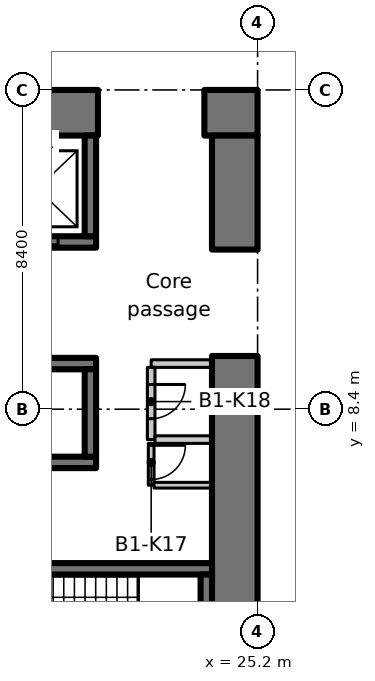
"""IFC4 building model, lengths in metres.
Left out: names, types, materials, properties, quantities, classifications, styles, units other than length and angle.
Written with IfcOpenShell. Run it as: python <this file> out.ifc"""

import sys

from ifc_helpers import new_model, si_unit, direction, frame, frame_2d, origin, place, context, subcontext, project, spatial, rectangle, extrude, element, fill, save


model = new_model("IFC4")
c1 = context("Model", 3, precision=1e-05, world=origin(), true_north=direction((0.0, 1.0)))
c2 = subcontext(c1, "Body", "Model", "MODEL_VIEW")
j1 = project(units=[si_unit("LENGTHUNIT", "METRE"), si_unit("PLANEANGLEUNIT", "RADIAN")], contexts=[c1])
p1 = place(None, origin())
s1 = spatial("IfcSite", under=j1, at=p1, CompositionType="ELEMENT")
p2 = place(p1, origin())
s2 = spatial("IfcBuilding", under=s1, at=p2, CompositionType="ELEMENT")
p3 = place(p2, frame((0.0, 0.0, -6.0)))
s3 = spatial("IfcBuildingStorey", under=s2, at=p3, CompositionType="ELEMENT", Elevation=-6.0)
p4 = place(p3, frame((-2.9, 16.2, 0.0), z_axis=(0.0, 0.0, 1.0), x_axis=(1.0, 0.0, 0.0)))
e1 = element("IfcWall", 1, at=p4, inside=s3, PredefinedType="SHEAR", context=c2, shape_type="SweptSolid", body=[
    extrude(rectangle(XDim=23.9, YDim=1.2, at=frame_2d((11.95, 0.0))), origin(), (0.0, 0.0, 1.0), 5.6),
])
p5 = place(p4, frame((4.95, 0.0, 0.0)))
e2 = element("IfcOpeningElement", 2, at=p5, cuts=e1, PredefinedType="OPENING", context=c2, shape_type="SweptSolid", body=[
    extrude(rectangle(XDim=1.1, YDim=2.3, at=frame_2d((0.55, 1.15))), frame((0.0, 0.61, 0.0), z_axis=(0.0, -1.0, 0.0), x_axis=(1.0, 0.0, 0.0)), (0.0, 0.0, 1.0), 1.22),
])
p6 = place(p3, frame((23.8, 16.2, 0.0), z_axis=(0.0, 0.0, 1.0), x_axis=(1.0, 0.0, 0.0)))
e3 = element("IfcWall", 3, at=p6, inside=s3, PredefinedType="SHEAR", context=c2, shape_type="SweptSolid", body=[
    extrude(rectangle(XDim=1.4, YDim=1.2, at=frame_2d((0.7, 0.0))), origin(), (0.0, 0.0, 1.0), 5.6),
])
p7 = place(p3, frame((24.6, 1.2, 0.0), z_axis=(0.0, 0.0, 1.0), x_axis=(0.0, 1.0, 0.0)))
e4 = element("IfcWall", 4, at=p7, inside=s3, PredefinedType="SHEAR", context=c2, shape_type="SweptSolid", body=[
    extrude(rectangle(XDim=8.6, YDim=1.2, at=frame_2d((4.3, 0.0))), origin(), (0.0, 0.0, 1.0), 5.6),
])
p8 = place(p3, frame((24.6, 12.6, 0.0), z_axis=(0.0, 0.0, 1.0), x_axis=(0.0, 1.0, 0.0)))
e5 = element("IfcWall", 5, at=p8, inside=s3, PredefinedType="SHEAR", context=c2, shape_type="SweptSolid", body=[
    extrude(rectangle(XDim=3.0, YDim=1.2, at=frame_2d((1.5, 0.0))), origin(), (0.0, 0.0, 1.0), 5.6),
])
p9 = place(p3, frame((1.2, 7.0, 0.0), z_axis=(0.0, 0.0, 1.0), x_axis=(1.0, 0.0, 0.0)))
e6 = element("IfcWall", 6, at=p9, inside=s3, PredefinedType="SHEAR", context=c2, shape_type="SweptSolid", body=[
    extrude(rectangle(XDim=19.75, YDim=0.3, at=frame_2d((9.875, 0.0))), origin(), (0.0, 0.0, 1.0), 5.6),
])
p10 = place(p3, frame((1.2, 9.6, 0.0), z_axis=(0.0, 0.0, 1.0), x_axis=(1.0, 0.0, 0.0)))
e7 = element("IfcWall", 7, at=p10, inside=s3, PredefinedType="SHEAR", context=c2, shape_type="SweptSolid", body=[
    extrude(rectangle(XDim=19.75, YDim=0.3, at=frame_2d((9.875, 0.0))), origin(), (0.0, 0.0, 1.0), 5.6),
])
p11 = place(p10, frame((0.85, 0.0, 0.0)))
e8 = element("IfcOpeningElement", 8, at=p11, cuts=e7, PredefinedType="OPENING", context=c2, shape_type="SweptSolid", body=[
    extrude(rectangle(XDim=1.1, YDim=2.3, at=frame_2d((0.55, 1.15))), frame((0.0, 0.16, 0.0), z_axis=(0.0, -1.0, 0.0), x_axis=(1.0, 0.0, 0.0)), (0.0, 0.0, 1.0), 0.32),
])
p12 = place(p10, frame((3.65, 0.0, 0.0)))
e9 = element("IfcOpeningElement", 9, at=p12, cuts=e7, PredefinedType="OPENING", context=c2, shape_type="SweptSolid", body=[
    extrude(rectangle(XDim=1.1, YDim=2.3, at=frame_2d((0.55, 1.15))), frame((0.0, 0.16, 0.0), z_axis=(0.0, -1.0, 0.0), x_axis=(1.0, 0.0, 0.0)), (0.0, 0.0, 1.0), 0.32),
])
p13 = place(p10, frame((6.45, 0.0, 0.0)))
e10 = element("IfcOpeningElement", 10, at=p13, cuts=e7, PredefinedType="OPENING", context=c2, shape_type="SweptSolid", body=[
    extrude(rectangle(XDim=1.1, YDim=2.3, at=frame_2d((0.55, 1.15))), frame((0.0, 0.16, 0.0), z_axis=(0.0, -1.0, 0.0), x_axis=(1.0, 0.0, 0.0)), (0.0, 0.0, 1.0), 0.32),
])
p14 = place(p10, frame((9.25, 0.0, 0.0)))
e11 = element("IfcOpeningElement", 11, at=p14, cuts=e7, PredefinedType="OPENING", context=c2, shape_type="SweptSolid", body=[
    extrude(rectangle(XDim=1.1, YDim=2.3, at=frame_2d((0.55, 1.15))), frame((0.0, 0.16, 0.0), z_axis=(0.0, -1.0, 0.0), x_axis=(1.0, 0.0, 0.0)), (0.0, 0.0, 1.0), 0.32),
])
p15 = place(p10, frame((12.05, 0.0, 0.0)))
e12 = element("IfcOpeningElement", 12, at=p15, cuts=e7, PredefinedType="OPENING", context=c2, shape_type="SweptSolid", body=[
    extrude(rectangle(XDim=1.1, YDim=2.3, at=frame_2d((0.55, 1.15))), frame((0.0, 0.16, 0.0), z_axis=(0.0, -1.0, 0.0), x_axis=(1.0, 0.0, 0.0)), (0.0, 0.0, 1.0), 0.32),
])
p16 = place(p10, frame((14.85, 0.0, 0.0)))
e13 = element("IfcOpeningElement", 13, at=p16, cuts=e7, PredefinedType="OPENING", context=c2, shape_type="SweptSolid", body=[
    extrude(rectangle(XDim=1.1, YDim=2.3, at=frame_2d((0.55, 1.15))), frame((0.0, 0.16, 0.0), z_axis=(0.0, -1.0, 0.0), x_axis=(1.0, 0.0, 0.0)), (0.0, 0.0, 1.0), 0.32),
])
p17 = place(p3, frame((20.8, 7.15, 0.0), z_axis=(0.0, 0.0, 1.0), x_axis=(0.0, 1.0, 0.0)))
e14 = element("IfcWall", 14, at=p17, inside=s3, PredefinedType="SHEAR", context=c2, shape_type="SweptSolid", body=[
    extrude(rectangle(XDim=2.3, YDim=0.3, at=frame_2d((1.15, 0.0))), origin(), (0.0, 0.0, 1.0), 5.6),
])
p18 = place(p3, frame((15.05, 12.8, 0.0), z_axis=(0.0, 0.0, 1.0), x_axis=(1.0, 0.0, 0.0)))
e15 = element("IfcWall", 15, at=p18, inside=s3, PredefinedType="SHEAR", context=c2, shape_type="SweptSolid", body=[
    extrude(rectangle(XDim=5.9, YDim=0.3, at=frame_2d((2.95, 0.0))), origin(), (0.0, 0.0, 1.0), 5.6),
])
p19 = place(p18, frame((3.8, 0.0, 0.0)))
e16 = element("IfcOpeningElement", 16, at=p19, cuts=e15, PredefinedType="OPENING", context=c2, shape_type="SweptSolid", body=[
    extrude(rectangle(XDim=1.1, YDim=2.3, at=frame_2d((0.55, 1.15))), frame((0.0, 0.16, 0.0), z_axis=(0.0, -1.0, 0.0), x_axis=(1.0, 0.0, 0.0)), (0.0, 0.0, 1.0), 0.32),
])
p20 = place(p3, frame((20.8, 12.95, 0.0), z_axis=(0.0, 0.0, 1.0), x_axis=(0.0, 1.0, 0.0)))
e17 = element("IfcWall", 17, at=p20, inside=s3, PredefinedType="SHEAR", context=c2, shape_type="SweptSolid", body=[
    extrude(rectangle(XDim=2.65, YDim=0.3, at=frame_2d((1.325, 0.0))), origin(), (0.0, 0.0, 1.0), 5.6),
])
p21 = place(p3, frame((15.8, 4.2, 0.0), z_axis=(0.0, 0.0, 1.0), x_axis=(1.0, 0.0, 0.0)))
e18 = element("IfcWall", 18, at=p21, inside=s3, PredefinedType="SHEAR", context=c2, shape_type="SweptSolid", body=[
    extrude(rectangle(XDim=8.2, YDim=0.3, at=frame_2d((4.1, 0.0))), origin(), (0.0, 0.0, 1.0), 5.6),
])
p22 = place(p21, frame((0.4, 0.0, 0.0)))
e19 = element("IfcOpeningElement", 19, at=p22, cuts=e18, PredefinedType="OPENING", context=c2, shape_type="SweptSolid", body=[
    extrude(rectangle(XDim=1.0, YDim=2.1, at=frame_2d((0.5, 1.05))), frame((0.0, 0.16, 0.0), z_axis=(0.0, -1.0, 0.0), x_axis=(1.0, 0.0, 0.0)), (0.0, 0.0, 1.0), 0.32),
])
p23 = place(p3, frame((23.85, 1.5, 0.0), z_axis=(0.0, 0.0, 1.0), x_axis=(0.0, 1.0, 0.0)))
e20 = element("IfcWall", 20, at=p23, inside=s3, PredefinedType="SHEAR", context=c2, shape_type="SweptSolid", body=[
    extrude(rectangle(XDim=2.55, YDim=0.3, at=frame_2d((1.275, 0.0))), origin(), (0.0, 0.0, 1.0), 5.6),
])
p24 = place(p3, frame((23.988, 9.6, 0.0), z_axis=(0.0, 0.0, 1.0), x_axis=(-1.0, 0.0, 0.0)))
e21 = element("IfcWall", 21, at=p24, inside=s3, PredefinedType="PARTITIONING", context=c2, shape_type="SweptSolid", body=[
    extrude(rectangle(XDim=1.588, YDim=0.2, at=frame_2d((0.794, 0.0))), origin(), (0.0, 0.0, 1.0), 5.6),
])
p25 = place(p3, frame((22.4, 9.5, 0.0), z_axis=(0.0, 0.0, 1.0), x_axis=(0.0, -1.0, 0.0)))
e22 = element("IfcWall", 22, at=p25, inside=s3, PredefinedType="PARTITIONING", context=c2, shape_type="SweptSolid", body=[
    extrude(rectangle(XDim=1.9, YDim=0.2, at=frame_2d((0.95, 0.0))), origin(), (0.0, 0.0, 1.0), 5.6),
])
p26 = place(p25, frame((0.45, 0.0, 0.0)))
e23 = element("IfcOpeningElement", 23, at=p26, cuts=e22, PredefinedType="OPENING", context=c2, shape_type="SweptSolid", body=[
    extrude(rectangle(XDim=0.9, YDim=2.1, at=frame_2d((0.45, 1.05))), frame((0.0, 0.11, 0.0), z_axis=(0.0, -1.0, 0.0), x_axis=(1.0, 0.0, 0.0)), (0.0, 0.0, 1.0), 0.22),
])
p27 = place(p3, frame((22.5, 7.6, 0.0), z_axis=(0.0, 0.0, 1.0), x_axis=(1.0, 0.0, 0.0)))
e24 = element("IfcWall", 24, at=p27, inside=s3, PredefinedType="PARTITIONING", context=c2, shape_type="SweptSolid", body=[
    extrude(rectangle(XDim=1.488, YDim=0.2, at=frame_2d((0.744, 0.0))), origin(), (0.0, 0.0, 1.0), 5.6),
])
p28 = place(p3, frame((22.4, 7.5, 0.0), z_axis=(0.0, 0.0, 1.0), x_axis=(0.0, -1.0, 0.0)))
e25 = element("IfcWall", 25, at=p28, inside=s3, PredefinedType="PARTITIONING", context=c2, shape_type="SweptSolid", body=[
    extrude(rectangle(XDim=1.1, YDim=0.15, at=frame_2d((0.55, 0.0))), origin(), (0.0, 0.0, 1.0), 5.6),
])
p29 = place(p28, frame((0.05, 0.0, 0.0)))
e26 = element("IfcOpeningElement", 26, at=p29, cuts=e25, PredefinedType="OPENING", context=c2, shape_type="SweptSolid", body=[
    extrude(rectangle(XDim=0.9, YDim=2.1, at=frame_2d((0.45, 1.05))), frame((0.0, 0.085, 0.0), z_axis=(0.0, -1.0, 0.0), x_axis=(1.0, 0.0, 0.0)), (0.0, 0.0, 1.0), 0.17),
])
p30 = place(p3, frame((22.475, 6.4, 0.0), z_axis=(0.0, 0.0, 1.0), x_axis=(1.0, 0.0, 0.0)))
e27 = element("IfcWall", 27, at=p30, inside=s3, PredefinedType="PARTITIONING", context=c2, shape_type="SweptSolid", body=[
    extrude(rectangle(XDim=1.513, YDim=0.15, at=frame_2d((0.756, 0.0))), origin(), (0.0, 0.0, 1.0), 5.6),
])
p31 = place(p19, origin())
e28 = element("IfcDoor", 28, at=p31, inside=s3, OperationType="SLIDING_TO_LEFT", PredefinedType="DOOR", context=c2, shape_type="SweptSolid", body=[
    extrude(rectangle(XDim=1.1, YDim=2.3, at=frame_2d((0.55, 1.15))), frame((0.0, 0.025, 0.0), z_axis=(0.0, -1.0, 0.0), x_axis=(1.0, 0.0, 0.0)), (0.0, 0.0, 1.0), 0.05),
])
fill(e16, e28)
p32 = place(p29, origin())
e29 = element("IfcDoor", 29, at=p32, inside=s3, OperationType="SINGLE_SWING_LEFT", PredefinedType="DOOR", context=c2, shape_type="SweptSolid", body=[
    extrude(rectangle(XDim=0.9, YDim=2.1, at=frame_2d((0.45, 1.05))), frame((0.0, 0.025, 0.0), z_axis=(0.0, -1.0, 0.0), x_axis=(1.0, 0.0, 0.0)), (0.0, 0.0, 1.0), 0.05),
])
fill(e26, e29)
p33 = place(p26, origin())
e30 = element("IfcDoor", 30, at=p33, inside=s3, OperationType="SINGLE_SWING_RIGHT", PredefinedType="DOOR", context=c2, shape_type="SweptSolid", body=[
    extrude(rectangle(XDim=0.9, YDim=2.1, at=frame_2d((0.45, 1.05))), frame((0.0, 0.025, 0.0), z_axis=(0.0, -1.0, 0.0), x_axis=(1.0, 0.0, 0.0)), (0.0, 0.0, 1.0), 0.05),
])
fill(e23, e30)
save(model, sys.argv[1])
